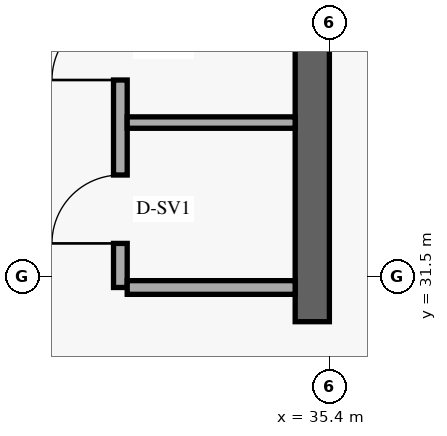
"""IFC4 building model, lengths in metres.
Left out: names, types, materials, properties, quantities, classifications, styles, units other than length and angle.
Written with IfcOpenShell. Run it as: python <this file> out.ifc"""

import sys

from ifc_helpers import new_model, si_unit, direction, frame, frame_2d, origin, origin_2d, place, context, subcontext, project, spatial, rectangle, extrude, element, fill, save


model = new_model("IFC4")
c1 = context("Model", 3, precision=1e-05, world=origin(), true_north=direction((0.0, 1.0)))
c2 = subcontext(c1, "Body", "Model", "MODEL_VIEW")
j1 = project(units=[si_unit("LENGTHUNIT", "METRE"), si_unit("PLANEANGLEUNIT", "RADIAN")], contexts=[c1])
p1 = place(None, origin())
s1 = spatial("IfcSite", under=j1, at=p1, CompositionType="ELEMENT")
p2 = place(p1, origin())
s2 = spatial("IfcBuilding", under=s1, at=p2, CompositionType="ELEMENT")
p3 = place(p2, frame((0.0, 0.0, -9.6)))
s3 = spatial("IfcBuildingStorey", under=s2, at=p3, CompositionType="ELEMENT", Elevation=-9.6)
p4 = place(p3, frame((35.175, 30.9, 0.0), z_axis=(0.0, 0.0, 1.0), x_axis=(0.0, 1.0, 0.0)))
e1 = element("IfcWall", 1, at=p4, inside=s3, PredefinedType="SHEAR", context=c2, shape_type="SweptSolid", body=[
    extrude(rectangle(XDim=7.15, YDim=0.45, at=frame_2d((3.575, 0.0))), origin(), (0.0, 0.0, 1.0), 3.629),
])
p5 = place(p3, frame((35.2, 30.2, 0.0), z_axis=(0.0, 0.0, 1.0), x_axis=(1.0, 0.0, 0.0)))
e2 = element("IfcColumn", 2, at=p5, inside=s3, PredefinedType="COLUMN", context=c2, shape_type="SweptSolid", body=[
    extrude(rectangle(XDim=1.4, YDim=1.4, at=origin_2d()), origin(), (0.0, 0.0, 1.0), 4.8),
])
p6 = place(p3, frame((32.65, 31.35, 0.0), z_axis=(0.0, 0.0, 1.0), x_axis=(0.0, 1.0, 0.0)))
e3 = element("IfcWall", 3, at=p6, inside=s3, PredefinedType="STANDARD", context=c2, shape_type="SweptSolid", body=[
    extrude(rectangle(XDim=7.175, YDim=0.18, at=frame_2d((3.587, 0.0))), origin(), (0.0, 0.0, 1.0), 4.48),
])
p7 = place(p6, frame((0.58, 0.0, 0.0)))
e4 = element("IfcOpeningElement", 4, at=p7, cuts=e3, PredefinedType="OPENING", context=c2, shape_type="SweptSolid", body=[
    extrude(rectangle(XDim=0.9, YDim=2.1, at=frame_2d((0.45, 1.05))), frame((0.0, 0.1, 0.0), z_axis=(0.0, -1.0, 0.0), x_axis=(1.0, 0.0, 0.0)), (0.0, 0.0, 1.0), 0.2),
])
p8 = place(p6, frame((2.73, 0.0, 0.0)))
e5 = element("IfcOpeningElement", 5, at=p8, cuts=e3, PredefinedType="OPENING", context=c2, shape_type="SweptSolid", body=[
    extrude(rectangle(XDim=0.9, YDim=2.1, at=frame_2d((0.45, 1.05))), frame((0.0, 0.1, 0.0), z_axis=(0.0, -1.0, 0.0), x_axis=(1.0, 0.0, 0.0)), (0.0, 0.0, 1.0), 0.2),
])
p9 = place(p6, frame((4.88, 0.0, 0.0)))
e6 = element("IfcOpeningElement", 6, at=p9, cuts=e3, PredefinedType="OPENING", context=c2, shape_type="SweptSolid", body=[
    extrude(rectangle(XDim=0.9, YDim=2.1, at=frame_2d((0.45, 1.05))), frame((0.0, 0.1, 0.0), z_axis=(0.0, -1.0, 0.0), x_axis=(1.0, 0.0, 0.0)), (0.0, 0.0, 1.0), 0.2),
])
p10 = place(p3, frame((32.74, 31.35, 0.0), z_axis=(0.0, 0.0, 1.0), x_axis=(1.0, 0.0, 0.0)))
e7 = element("IfcWall", 7, at=p10, inside=s3, PredefinedType="STANDARD", context=c2, shape_type="SweptSolid", body=[
    extrude(rectangle(XDim=2.21, YDim=0.18, at=frame_2d((1.105, 0.0))), origin(), (0.0, 0.0, 1.0), 4.48),
])
p11 = place(p3, frame((32.74, 33.52, 0.0), z_axis=(0.0, 0.0, 1.0), x_axis=(1.0, 0.0, 0.0)))
e8 = element("IfcWall", 8, at=p11, inside=s3, PredefinedType="STANDARD", context=c2, shape_type="SweptSolid", body=[
    extrude(rectangle(XDim=2.21, YDim=0.15, at=frame_2d((1.105, 0.0))), origin(), (0.0, 0.0, 1.0), 4.48),
])
p12 = place(p7, origin())
e9 = element("IfcDoor", 9, at=p12, inside=s3, OperationType="SINGLE_SWING_LEFT", PredefinedType="DOOR", context=c2, shape_type="SweptSolid", body=[
    extrude(rectangle(XDim=0.9, YDim=2.1, at=frame_2d((0.45, 1.05))), frame((0.0, 0.025, 0.0), z_axis=(0.0, -1.0, 0.0), x_axis=(1.0, 0.0, 0.0)), (0.0, 0.0, 1.0), 0.05),
])
fill(e4, e9)
p13 = place(p8, origin())
e10 = element("IfcDoor", 10, at=p13, inside=s3, OperationType="SINGLE_SWING_LEFT", PredefinedType="DOOR", context=c2, shape_type="SweptSolid", body=[
    extrude(rectangle(XDim=0.9, YDim=2.1, at=frame_2d((0.45, 1.05))), frame((0.0, 0.025, 0.0), z_axis=(0.0, -1.0, 0.0), x_axis=(1.0, 0.0, 0.0)), (0.0, 0.0, 1.0), 0.05),
])
fill(e5, e10)
save(model, sys.argv[1])
